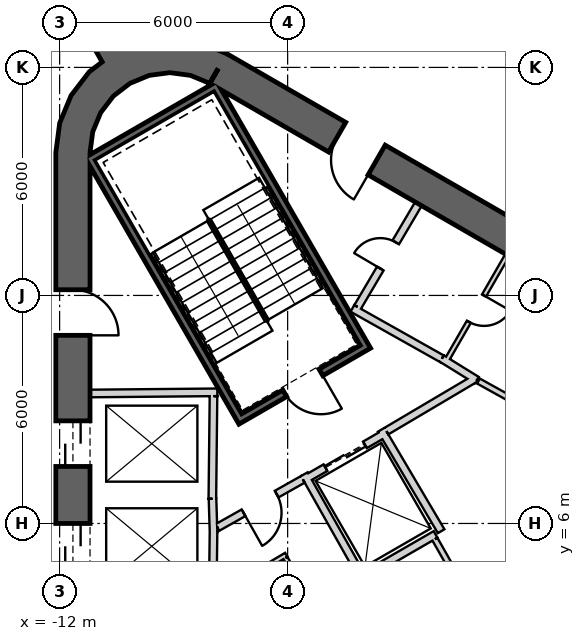
"""IFC4 building model, lengths in metres.
Left out: names, types, materials, properties, quantities, classifications, styles, units other than length and angle.
Written with IfcOpenShell. Run it as: python <this file> out.ifc"""

import sys

from ifc_helpers import new_model, si_unit, direction, frame, frame_2d, origin, place, context, subcontext, project, spatial, polyline, rectangle, outline, extrude, element, fill, save


model = new_model("IFC4")
c1 = context("Model", 3, precision=1e-05, world=origin(), true_north=direction((0.0, 1.0)))
c2 = subcontext(c1, "Body", "Model", "MODEL_VIEW")
j1 = project(units=[si_unit("LENGTHUNIT", "METRE"), si_unit("PLANEANGLEUNIT", "RADIAN")], contexts=[c1])
p1 = place(None, origin())
s1 = spatial("IfcSite", under=j1, at=p1, CompositionType="ELEMENT")
p2 = place(p1, origin())
s2 = spatial("IfcBuilding", under=s1, at=p2, CompositionType="ELEMENT")
p3 = place(p2, frame((0.0, 0.0, 253.2)))
s3 = spatial("IfcBuildingStorey", under=s2, at=p3, CompositionType="ELEMENT", Elevation=253.2)
p4 = place(p3, frame((19.475, 2.208, 0.0), z_axis=(0.0, 0.0, 1.0), x_axis=(-0.866028369851, 0.499994862586, 0.0)))
e1 = element("IfcWall", 1, at=p4, inside=s3, PredefinedType="SHEAR", context=c2, shape_type="SweptSolid", body=[
    extrude(rectangle(XDim=31.523, YDim=0.9, at=frame_2d((15.762, 0.0))), origin(), (0.0, 0.0, 1.0), 4.0),
])
p5 = place(p4, frame((7.062, 0.0, 0.0)))
e2 = element("IfcOpeningElement", 2, at=p5, cuts=e1, PredefinedType="OPENING", context=c2, shape_type="SweptSolid", body=[
    extrude(rectangle(XDim=1.2, YDim=2.4, at=frame_2d((0.6, 1.2))), frame((0.0, 0.46, 0.0), z_axis=(0.0, -1.0, 0.0), x_axis=(1.0, 0.0, 0.0)), (0.0, 0.0, 1.0), 0.92),
])
p6 = place(p4, frame((3.612, 0.0, 0.0)))
e3 = element("IfcOpeningElement", 3, at=p6, cuts=e1, PredefinedType="OPENING", context=c2, shape_type="SweptSolid", body=[
    extrude(rectangle(XDim=1.2, YDim=2.4, at=frame_2d((0.6, 1.2))), frame((0.0, 0.46, 0.0), z_axis=(0.0, -1.0, 0.0), x_axis=(1.0, 0.0, 0.0)), (0.0, 0.0, 1.0), 0.92),
])
p7 = place(p4, frame((26.712, 0.0, 0.0)))
e4 = element("IfcOpeningElement", 4, at=p7, cuts=e1, PredefinedType="OPENING", context=c2, shape_type="SweptSolid", body=[
    extrude(rectangle(XDim=1.2, YDim=2.4, at=frame_2d((0.6, 1.2))), frame((0.0, 0.46, 0.0), z_axis=(0.0, -1.0, 0.0), x_axis=(1.0, 0.0, 0.0)), (0.0, 0.0, 1.0), 0.92),
])
p8 = place(p3, frame((-11.65, 15.762, 0.0), z_axis=(0.0, 0.0, 1.0), x_axis=(0.0, -1.0, 0.0)))
e5 = element("IfcWall", 5, at=p8, inside=s3, PredefinedType="SHEAR", context=c2, shape_type="SweptSolid", body=[
    extrude(rectangle(XDim=31.523, YDim=0.9, at=frame_2d((15.762, 0.0))), origin(), (0.0, 0.0, 1.0), 4.0),
])
p9 = place(p8, frame((7.062, 0.0, 0.0)))
e6 = element("IfcOpeningElement", 6, at=p9, cuts=e5, PredefinedType="OPENING", context=c2, shape_type="SweptSolid", body=[
    extrude(rectangle(XDim=1.2, YDim=2.4, at=frame_2d((0.6, 1.2))), frame((0.0, 0.46, 0.0), z_axis=(0.0, -1.0, 0.0), x_axis=(1.0, 0.0, 0.0)), (0.0, 0.0, 1.0), 0.92),
])
p10 = place(p8, frame((9.762, 0.0, 0.0)))
e7 = element("IfcOpeningElement", 7, at=p10, cuts=e5, PredefinedType="OPENING", context=c2, shape_type="SweptSolid", body=[
    extrude(rectangle(XDim=1.2, YDim=2.4, at=frame_2d((0.6, 1.2))), frame((0.0, 0.46, 0.0), z_axis=(0.0, -1.0, 0.0), x_axis=(1.0, 0.0, 0.0)), (0.0, 0.0, 1.0), 0.92),
])
p11 = place(p8, frame((12.462, 0.0, 0.0)))
e8 = element("IfcOpeningElement", 8, at=p11, cuts=e5, PredefinedType="OPENING", context=c2, shape_type="SweptSolid", body=[
    extrude(rectangle(XDim=1.2, YDim=2.4, at=frame_2d((0.6, 1.2))), frame((0.0, 0.46, 0.0), z_axis=(0.0, -1.0, 0.0), x_axis=(1.0, 0.0, 0.0)), (0.0, 0.0, 1.0), 0.92),
])
p12 = place(p8, frame((15.162, 0.0, 0.0)))
e9 = element("IfcOpeningElement", 9, at=p12, cuts=e5, PredefinedType="OPENING", context=c2, shape_type="SweptSolid", body=[
    extrude(rectangle(XDim=1.2, YDim=2.4, at=frame_2d((0.6, 1.2))), frame((0.0, 0.46, 0.0), z_axis=(0.0, -1.0, 0.0), x_axis=(1.0, 0.0, 0.0)), (0.0, 0.0, 1.0), 0.92),
])
p13 = place(p8, frame((17.862, 0.0, 0.0)))
e10 = element("IfcOpeningElement", 10, at=p13, cuts=e5, PredefinedType="OPENING", context=c2, shape_type="SweptSolid", body=[
    extrude(rectangle(XDim=1.2, YDim=2.4, at=frame_2d((0.6, 1.2))), frame((0.0, 0.46, 0.0), z_axis=(0.0, -1.0, 0.0), x_axis=(1.0, 0.0, 0.0)), (0.0, 0.0, 1.0), 0.92),
])
p14 = place(p8, frame((20.562, 0.0, 0.0)))
e11 = element("IfcOpeningElement", 11, at=p14, cuts=e5, PredefinedType="OPENING", context=c2, shape_type="SweptSolid", body=[
    extrude(rectangle(XDim=1.2, YDim=2.4, at=frame_2d((0.6, 1.2))), frame((0.0, 0.46, 0.0), z_axis=(0.0, -1.0, 0.0), x_axis=(1.0, 0.0, 0.0)), (0.0, 0.0, 1.0), 0.92),
])
p15 = place(p8, frame((23.262, 0.0, 0.0)))
e12 = element("IfcOpeningElement", 12, at=p15, cuts=e5, PredefinedType="OPENING", context=c2, shape_type="SweptSolid", body=[
    extrude(rectangle(XDim=1.2, YDim=2.4, at=frame_2d((0.6, 1.2))), frame((0.0, 0.46, 0.0), z_axis=(0.0, -1.0, 0.0), x_axis=(1.0, 0.0, 0.0)), (0.0, 0.0, 1.0), 0.92),
])
p16 = place(p8, frame((3.612, 0.0, 0.0)))
e13 = element("IfcOpeningElement", 13, at=p16, cuts=e5, PredefinedType="OPENING", context=c2, shape_type="SweptSolid", body=[
    extrude(rectangle(XDim=1.2, YDim=2.4, at=frame_2d((0.6, 1.2))), frame((0.0, 0.46, 0.0), z_axis=(0.0, -1.0, 0.0), x_axis=(1.0, 0.0, 0.0)), (0.0, 0.0, 1.0), 0.92),
])
p17 = place(p8, frame((26.712, 0.0, 0.0)))
e14 = element("IfcOpeningElement", 14, at=p17, cuts=e5, PredefinedType="OPENING", context=c2, shape_type="SweptSolid", body=[
    extrude(rectangle(XDim=1.2, YDim=2.4, at=frame_2d((0.6, 1.2))), frame((0.0, 0.46, 0.0), z_axis=(0.0, -1.0, 0.0), x_axis=(1.0, 0.0, 0.0)), (0.0, 0.0, 1.0), 0.92),
])
p18 = place(p3, origin())
e15 = element("IfcWall", 15, at=p18, inside=s3, PredefinedType="SHEAR", context=c2, shape_type="SweptSolid", body=[
    extrude(outline(polyline([(-7.6, 18.36), (-8.323, 18.659), (-9.1, 18.762), (-9.876, 18.659), (-10.6, 18.36), (-11.221, 17.883), (-11.698, 17.262), (-11.998, 16.538), (-12.1, 15.762), (-11.2, 15.762), (-11.128, 16.305), (-10.919, 16.812), (-10.585, 17.247), (-10.15, 17.58), (-9.644, 17.79), (-9.1, 17.862), (-8.556, 17.79), (-8.05, 17.58), (-7.6, 18.36)])), origin(), (0.0, 0.0, 1.0), 4.0),
])
p19 = place(p3, frame((-10.575, 18.316, 0.0), z_axis=(0.0, 0.0, 1.0), x_axis=(-0.500010108608, 0.866019567498, 0.0)))
e16 = element("IfcWall", 16, at=p19, inside=s3, PredefinedType="SHEAR", context=c2, shape_type="SweptSolid", body=[
    extrude(rectangle(XDim=10.432, YDim=0.7, at=frame_2d((5.216, 0.0))), origin(), (0.0, 0.0, 1.0), 4.0),
])
p20 = place(p3, frame((-11.2, 9.42, 0.0), z_axis=(0.0, 0.0, 1.0), x_axis=(0.999957167047, 0.009255488683, 0.0)))
e17 = element("IfcWall", 17, at=p20, inside=s3, PredefinedType="PLUMBINGWALL", context=c2, shape_type="SweptSolid", body=[
    extrude(rectangle(XDim=3.35, YDim=0.2, at=frame_2d((1.675, 0.0))), origin(), (0.0, 0.0, 1.0), 3.7),
])
p21 = place(p3, frame((-7.951, 9.35, 0.0), z_axis=(0.0, 0.0, 1.0), x_axis=(-0.011120469654, -0.999938165666, 0.0)))
e18 = element("IfcWall", 18, at=p21, inside=s3, PredefinedType="PLUMBINGWALL", context=c2, shape_type="SweptSolid", body=[
    extrude(rectangle(XDim=2.7, YDim=0.2, at=frame_2d((1.35, 0.0))), origin(), (0.0, 0.0, 1.0), 3.7),
])
p22 = place(p3, frame((-7.977, 6.65, 0.0), z_axis=(0.0, 0.0, 1.0), x_axis=(0.030861509705, -0.999523670164, 0.0)))
e19 = element("IfcWall", 19, at=p22, inside=s3, PredefinedType="PLUMBINGWALL", context=c2, shape_type="SweptSolid", body=[
    extrude(rectangle(XDim=0.878, YDim=0.2, at=frame_2d((0.439, 0.0))), origin(), (0.0, 0.0, 1.0), 3.7),
])
p23 = place(p3, frame((-7.949, 5.895, 0.0), z_axis=(0.0, 0.0, 1.0), x_axis=(-0.012042535896, -0.999927486035, 0.0)))
e20 = element("IfcWall", 20, at=p23, inside=s3, PredefinedType="PLUMBINGWALL", context=c2, shape_type="SweptSolid", body=[
    extrude(rectangle(XDim=1.845, YDim=0.2, at=frame_2d((0.922, 0.0))), origin(), (0.0, 0.0, 1.0), 3.7),
])
p24 = place(p3, frame((-11.245, 15.678, -0.3), z_axis=(0.0, 0.0, 1.0), x_axis=(0.499977274689, -0.866038523851, 0.0)))
e21 = element("IfcWall", 21, at=p24, inside=s3, PredefinedType="SHEAR", context=c2, shape_type="SweptSolid", body=[
    extrude(rectangle(XDim=8.1, YDim=0.2, at=frame_2d((4.05, 0.0))), origin(), (0.0, 0.0, 1.0), 4.0),
])
p25 = place(p3, frame((-7.818, 17.541, -0.3), z_axis=(0.0, 0.0, 1.0), x_axis=(-0.866044365799, -0.499967155389, 0.0)))
e22 = element("IfcWall", 22, at=p25, inside=s3, PredefinedType="SHEAR", context=c2, shape_type="SweptSolid", body=[
    extrude(rectangle(XDim=3.8, YDim=0.2, at=frame_2d((1.9, 0.0))), origin(), (0.0, 0.0, 1.0), 4.0),
])
p26 = place(p3, frame((-7.854, 17.405, -0.3), z_axis=(0.0, 0.0, 1.0), x_axis=(0.499997992926, -0.866026562566, 0.0)))
e23 = element("IfcWall", 23, at=p26, inside=s3, PredefinedType="SHEAR", context=c2, shape_type="SweptSolid", body=[
    extrude(rectangle(XDim=7.9, YDim=0.2, at=frame_2d((3.95, 0.0))), origin(), (0.0, 0.0, 1.0), 4.0),
])
p27 = place(p3, frame((-7.159, 8.8, -0.3), z_axis=(0.0, 0.0, 1.0), x_axis=(0.866047807691, 0.499961193289, 0.0)))
e24 = element("IfcWall", 24, at=p27, inside=s3, PredefinedType="SHEAR", context=c2, shape_type="SweptSolid", body=[
    extrude(rectangle(XDim=3.6, YDim=0.2, at=frame_2d((1.8, 0.0))), origin(), (0.0, 0.0, 1.0), 4.0),
])
p28 = place(p27, frame((1.25, 0.0, 0.3)))
e25 = element("IfcOpeningElement", 25, at=p28, cuts=e24, PredefinedType="OPENING", context=c2, shape_type="SweptSolid", body=[
    extrude(rectangle(XDim=1.1, YDim=2.1, at=frame_2d((0.55, 1.05))), frame((0.0, 0.11, 0.0), z_axis=(0.0, -1.0, 0.0), x_axis=(1.0, 0.0, 0.0)), (0.0, 0.0, 1.0), 0.22),
])
p29 = place(p3, frame((-5.524, 7.168, 0.0), z_axis=(0.0, 0.0, 1.0), x_axis=(0.866024647952, 0.500001309137, 0.0)))
e26 = element("IfcWall", 26, at=p29, inside=s3, PredefinedType="PLUMBINGWALL", context=c2, shape_type="SweptSolid", body=[
    extrude(rectangle(XDim=2.4, YDim=0.2, at=frame_2d((1.2, 0.0))), origin(), (0.0, 0.0, 1.0), 3.7),
])
p30 = place(p29, frame((0.6, 0.0, 0.0)))
e27 = element("IfcOpeningElement", 27, at=p30, cuts=e26, PredefinedType="OPENING", context=c2, shape_type="SweptSolid", body=[
    extrude(rectangle(XDim=1.2, YDim=2.4, at=frame_2d((0.6, 1.2))), frame((0.0, 0.11, 0.0), z_axis=(0.0, -1.0, 0.0), x_axis=(1.0, 0.0, 0.0)), (0.0, 0.0, 1.0), 0.22),
])
p31 = place(p3, frame((-3.538, 8.465, 0.0), z_axis=(0.0, 0.0, 1.0), x_axis=(0.508647062354, -0.860975125052, 0.0)))
e28 = element("IfcWall", 28, at=p31, inside=s3, PredefinedType="PLUMBINGWALL", context=c2, shape_type="SweptSolid", body=[
    extrude(rectangle(XDim=3.1, YDim=0.2, at=frame_2d((1.55, 0.0))), origin(), (0.0, 0.0, 1.0), 3.7),
])
p32 = place(p3, frame((-2.108, 5.711, 0.0), z_axis=(0.0, 0.0, 1.0), x_axis=(-0.866009305107, -0.50002788269, 0.0)))
e29 = element("IfcWall", 29, at=p32, inside=s3, PredefinedType="PLUMBINGWALL", context=c2, shape_type="SweptSolid", body=[
    extrude(rectangle(XDim=2.329, YDim=0.2, at=frame_2d((1.165, 0.0))), origin(), (0.0, 0.0, 1.0), 3.7),
])
p33 = place(p3, frame((-5.562, 7.296, 0.0), z_axis=(0.0, 0.0, 1.0), x_axis=(0.49134651263, -0.870964180966, 0.0)))
e30 = element("IfcWall", 30, at=p33, inside=s3, PredefinedType="PLUMBINGWALL", context=c2, shape_type="SweptSolid", body=[
    extrude(rectangle(XDim=3.0, YDim=0.2, at=frame_2d((1.5, 0.0))), origin(), (0.0, 0.0, 1.0), 3.7),
])
p34 = place(p3, frame((-0.22, 13.06, 0.0), z_axis=(0.0, 0.0, 1.0), x_axis=(-0.499984717929, -0.866034226713, 0.0)))
e31 = element("IfcWall", 31, at=p34, inside=s3, PredefinedType="PARTITIONING", context=c2, shape_type="SweptSolid", body=[
    extrude(rectangle(XDim=3.25, YDim=0.12, at=frame_2d((1.625, 0.0))), origin(), (0.0, 0.0, 1.0), 3.7),
])
p35 = place(p34, frame((1.225, 0.0, 0.0)))
e32 = element("IfcOpeningElement", 32, at=p35, cuts=e31, PredefinedType="OPENING", context=c2, shape_type="SweptSolid", body=[
    extrude(rectangle(XDim=0.8, YDim=2.1, at=frame_2d((0.4, 1.05))), frame((0.0, 0.07, 0.0), z_axis=(0.0, -1.0, 0.0), x_axis=(1.0, 0.0, 0.0)), (0.0, 0.0, 1.0), 0.14),
])
p36 = place(p3, frame((-1.941, 10.339, 0.0), z_axis=(0.0, 0.0, 1.0), x_axis=(0.850216889117, -0.526432561171, 0.0)))
e33 = element("IfcWall", 33, at=p36, inside=s3, PredefinedType="PARTITIONING", context=c2, shape_type="SweptSolid", body=[
    extrude(rectangle(XDim=1.078, YDim=0.2, at=frame_2d((0.539, 0.0))), origin(), (0.0, 0.0, 1.0), 3.7),
])
p37 = place(p3, frame((0.483, 8.936, 0.0), z_axis=(0.0, 0.0, 1.0), x_axis=(-0.874315691004, 0.485357674776, 0.0)))
e34 = element("IfcWall", 34, at=p37, inside=s3, PredefinedType="PLUMBINGWALL", context=c2, shape_type="SweptSolid", body=[
    extrude(rectangle(XDim=1.671, YDim=0.15, at=frame_2d((0.836, 0.0))), origin(), (0.0, 0.0, 1.0), 3.7),
])
p38 = place(p3, frame((-4.296, 11.659, 0.0), z_axis=(0.0, 0.0, 1.0), x_axis=(0.871534483978, -0.490334215854, 0.0)))
e35 = element("IfcWall", 35, at=p38, inside=s3, PredefinedType="PARTITIONING", context=c2, shape_type="SweptSolid", body=[
    extrude(rectangle(XDim=2.7, YDim=0.2, at=frame_2d((1.35, 0.0))), origin(), (0.0, 0.0, 1.0), 3.7),
])
p39 = place(p3, frame((-2.558, 14.409, 0.0), z_axis=(0.0, 0.0, 1.0), x_axis=(-0.508018930956, -0.861345903683, 0.0)))
e36 = element("IfcWall", 36, at=p39, inside=s3, PredefinedType="PARTITIONING", context=c2, shape_type="SweptSolid", body=[
    extrude(rectangle(XDim=3.15, YDim=0.2, at=frame_2d((1.575, 0.0))), origin(), (0.0, 0.0, 1.0), 3.7),
])
p40 = place(p39, frame((1.175, 0.0, 0.0)))
e37 = element("IfcOpeningElement", 37, at=p40, cuts=e36, PredefinedType="OPENING", context=c2, shape_type="SweptSolid", body=[
    extrude(rectangle(XDim=0.8, YDim=2.1, at=frame_2d((0.4, 1.05))), frame((0.0, 0.11, 0.0), z_axis=(0.0, -1.0, 0.0), x_axis=(1.0, 0.0, 0.0)), (0.0, 0.0, 1.0), 0.22),
])
p41 = place(p3, frame((-1.056, 9.818, 0.0), z_axis=(0.0, 0.0, 1.0), x_axis=(-0.860599924646, -0.509281621207, 0.0)))
e38 = element("IfcWall", 38, at=p41, inside=s3, PredefinedType="PARTITIONING", context=c2, shape_type="SweptSolid", body=[
    extrude(rectangle(XDim=2.725, YDim=0.2, at=frame_2d((1.362, 0.0))), origin(), (0.0, 0.0, 1.0), 3.7),
])
p42 = place(p3, frame((-5.6, 7.16, 0.0), z_axis=(0.0, 0.0, 1.0), x_axis=(-0.871363259478, -0.490638431059, 0.0)))
e39 = element("IfcWall", 39, at=p42, inside=s3, PredefinedType="PARTITIONING", context=c2, shape_type="SweptSolid", body=[
    extrude(rectangle(XDim=2.581, YDim=0.2, at=frame_2d((1.291, 0.0))), origin(), (0.0, 0.0, 1.0), 3.7),
])
p43 = place(p42, frame((0.791, 0.0, 0.0)))
e40 = element("IfcOpeningElement", 40, at=p43, cuts=e39, PredefinedType="OPENING", context=c2, shape_type="SweptSolid", body=[
    extrude(rectangle(XDim=1.0, YDim=2.1, at=frame_2d((0.5, 1.05))), frame((0.0, 0.11, 0.0), z_axis=(0.0, -1.0, 0.0), x_axis=(1.0, 0.0, 0.0)), (0.0, 0.0, 1.0), 0.22),
])
p44 = place(p3, frame((-2.124, 5.586, 0.0), z_axis=(0.0, 0.0, 1.0), x_axis=(0.493408695398, -0.869797596746, 0.0)))
e41 = element("IfcWall", 41, at=p44, inside=s3, PredefinedType="PLUMBINGWALL", context=c2, shape_type="SweptSolid", body=[
    extrude(rectangle(XDim=3.778, YDim=0.15, at=frame_2d((1.889, 0.0))), origin(), (0.0, 0.0, 1.0), 3.7),
])
p45 = place(p44, frame((1.489, 0.0, 0.0)))
e42 = element("IfcOpeningElement", 42, at=p45, cuts=e41, PredefinedType="OPENING", context=c2, shape_type="SweptSolid", body=[
    extrude(rectangle(XDim=0.8, YDim=2.1, at=frame_2d((0.4, 1.05))), frame((0.0, 0.085, 0.0), z_axis=(0.0, -1.0, 0.0), x_axis=(1.0, 0.0, 0.0)), (0.0, 0.0, 1.0), 0.17),
])
p46 = place(p3, frame((-6.037, 5.176, 0.0), z_axis=(0.0, 0.0, 1.0), x_axis=(-0.860106072674, -0.510115225953, 0.0)))
e43 = element("IfcWall", 43, at=p46, inside=s3, PredefinedType="PARTITIONING", context=c2, shape_type="SweptSolid", body=[
    extrude(rectangle(XDim=2.225, YDim=0.12, at=frame_2d((1.112, 0.0))), origin(), (0.0, 0.0, 1.0), 3.7),
])
p47 = place(p3, frame((-4.558, 2.495, 0.0), z_axis=(0.0, 0.0, 1.0), x_axis=(-0.499990139034, 0.866031096941, 0.0)))
e44 = element("IfcWall", 44, at=p47, inside=s3, PredefinedType="PARTITIONING", context=c2, shape_type="SweptSolid", body=[
    extrude(rectangle(XDim=3.0, YDim=0.12, at=frame_2d((1.5, 0.0))), origin(), (0.0, 0.0, 1.0), 3.7),
])
p48 = place(p3, frame((4.283, 16.118, 0.0), z_axis=(0.0, 0.0, 1.0), x_axis=(-0.866016186489, 0.500015964484, 0.0)))
e45 = element("IfcWall", 45, at=p48, inside=s3, PredefinedType="PARTITIONING", context=c2, shape_type="SweptSolid", body=[
    extrude(rectangle(XDim=12.096, YDim=0.2, at=frame_2d((6.048, 0.0))), origin(), (0.0, 0.0, 1.0), 2.98),
])
p49 = place(p28, origin())
e46 = element("IfcDoor", 46, at=p49, inside=s3, OperationType="SINGLE_SWING_LEFT", PredefinedType="USERDEFINED", context=c2, shape_type="SweptSolid", body=[
    extrude(rectangle(XDim=1.1, YDim=2.1, at=frame_2d((0.55, 1.05))), frame((0.0, 0.025, 0.0), z_axis=(0.0, -1.0, 0.0), x_axis=(1.0, 0.0, 0.0)), (0.0, 0.0, 1.0), 0.05),
])
fill(e25, e46)
p50 = place(p43, origin())
e47 = element("IfcDoor", 47, at=p50, inside=s3, OperationType="SINGLE_SWING_RIGHT", PredefinedType="USERDEFINED", context=c2, shape_type="SweptSolid", body=[
    extrude(rectangle(XDim=1.0, YDim=2.1, at=frame_2d((0.5, 1.05))), frame((0.0, 0.025, 0.0), z_axis=(0.0, -1.0, 0.0), x_axis=(1.0, 0.0, 0.0)), (0.0, 0.0, 1.0), 0.05),
])
fill(e40, e47)
p51 = place(p30, origin())
e48 = element("IfcDoor", 48, at=p51, inside=s3, OperationType="SLIDING_TO_LEFT", PredefinedType="USERDEFINED", context=c2, shape_type="SweptSolid", body=[
    extrude(rectangle(XDim=1.2, YDim=2.4, at=frame_2d((0.6, 1.2))), frame((0.0, 0.025, 0.0), z_axis=(0.0, -1.0, 0.0), x_axis=(1.0, 0.0, 0.0)), (0.0, 0.0, 1.0), 0.05),
])
fill(e27, e48)
p52 = place(p40, origin())
e49 = element("IfcDoor", 49, at=p52, inside=s3, OperationType="SINGLE_SWING_LEFT", PredefinedType="USERDEFINED", context=c2, shape_type="SweptSolid", body=[
    extrude(rectangle(XDim=0.8, YDim=2.1, at=frame_2d((0.4, 1.05))), frame((0.0, 0.025, 0.0), z_axis=(0.0, -1.0, 0.0), x_axis=(1.0, 0.0, 0.0)), (0.0, 0.0, 1.0), 0.05),
])
fill(e37, e49)
p53 = place(p35, origin())
e50 = element("IfcDoor", 50, at=p53, inside=s3, OperationType="SINGLE_SWING_LEFT", PredefinedType="USERDEFINED", context=c2, shape_type="SweptSolid", body=[
    extrude(rectangle(XDim=0.8, YDim=2.1, at=frame_2d((0.4, 1.05))), frame((0.0, 0.025, 0.0), z_axis=(0.0, -1.0, 0.0), x_axis=(1.0, 0.0, 0.0)), (0.0, 0.0, 1.0), 0.05),
])
fill(e32, e50)
p54 = place(p9, origin())
e51 = element("IfcDoor", 51, at=p54, inside=s3, OperationType="SLIDING_TO_LEFT", PredefinedType="USERDEFINED", context=c2, shape_type="SweptSolid", body=[
    extrude(rectangle(XDim=1.2, YDim=2.4, at=frame_2d((0.6, 1.2))), frame((0.0, 0.025, 0.0), z_axis=(0.0, -1.0, 0.0), x_axis=(1.0, 0.0, 0.0)), (0.0, 0.0, 1.0), 0.05),
])
fill(e6, e51)
p55 = place(p10, origin())
e52 = element("IfcDoor", 52, at=p55, inside=s3, OperationType="SLIDING_TO_LEFT", PredefinedType="USERDEFINED", context=c2, shape_type="SweptSolid", body=[
    extrude(rectangle(XDim=1.2, YDim=2.4, at=frame_2d((0.6, 1.2))), frame((0.0, 0.025, 0.0), z_axis=(0.0, -1.0, 0.0), x_axis=(1.0, 0.0, 0.0)), (0.0, 0.0, 1.0), 0.05),
])
fill(e7, e52)
p56 = place(p7, origin())
e53 = element("IfcDoor", 53, at=p56, inside=s3, OperationType="SINGLE_SWING_RIGHT", PredefinedType="USERDEFINED", context=c2, shape_type="SweptSolid", body=[
    extrude(rectangle(XDim=1.2, YDim=2.4, at=frame_2d((0.6, 1.2))), frame((0.0, 0.025, 0.0), z_axis=(0.0, -1.0, 0.0), x_axis=(1.0, 0.0, 0.0)), (0.0, 0.0, 1.0), 0.05),
])
fill(e4, e53)
p57 = place(p16, origin())
e54 = element("IfcDoor", 54, at=p57, inside=s3, OperationType="SINGLE_SWING_LEFT", PredefinedType="USERDEFINED", context=c2, shape_type="SweptSolid", body=[
    extrude(rectangle(XDim=1.2, YDim=2.4, at=frame_2d((0.6, 1.2))), frame((0.0, 0.025, 0.0), z_axis=(0.0, -1.0, 0.0), x_axis=(1.0, 0.0, 0.0)), (0.0, 0.0, 1.0), 0.05),
])
fill(e13, e54)
save(model, sys.argv[1])
